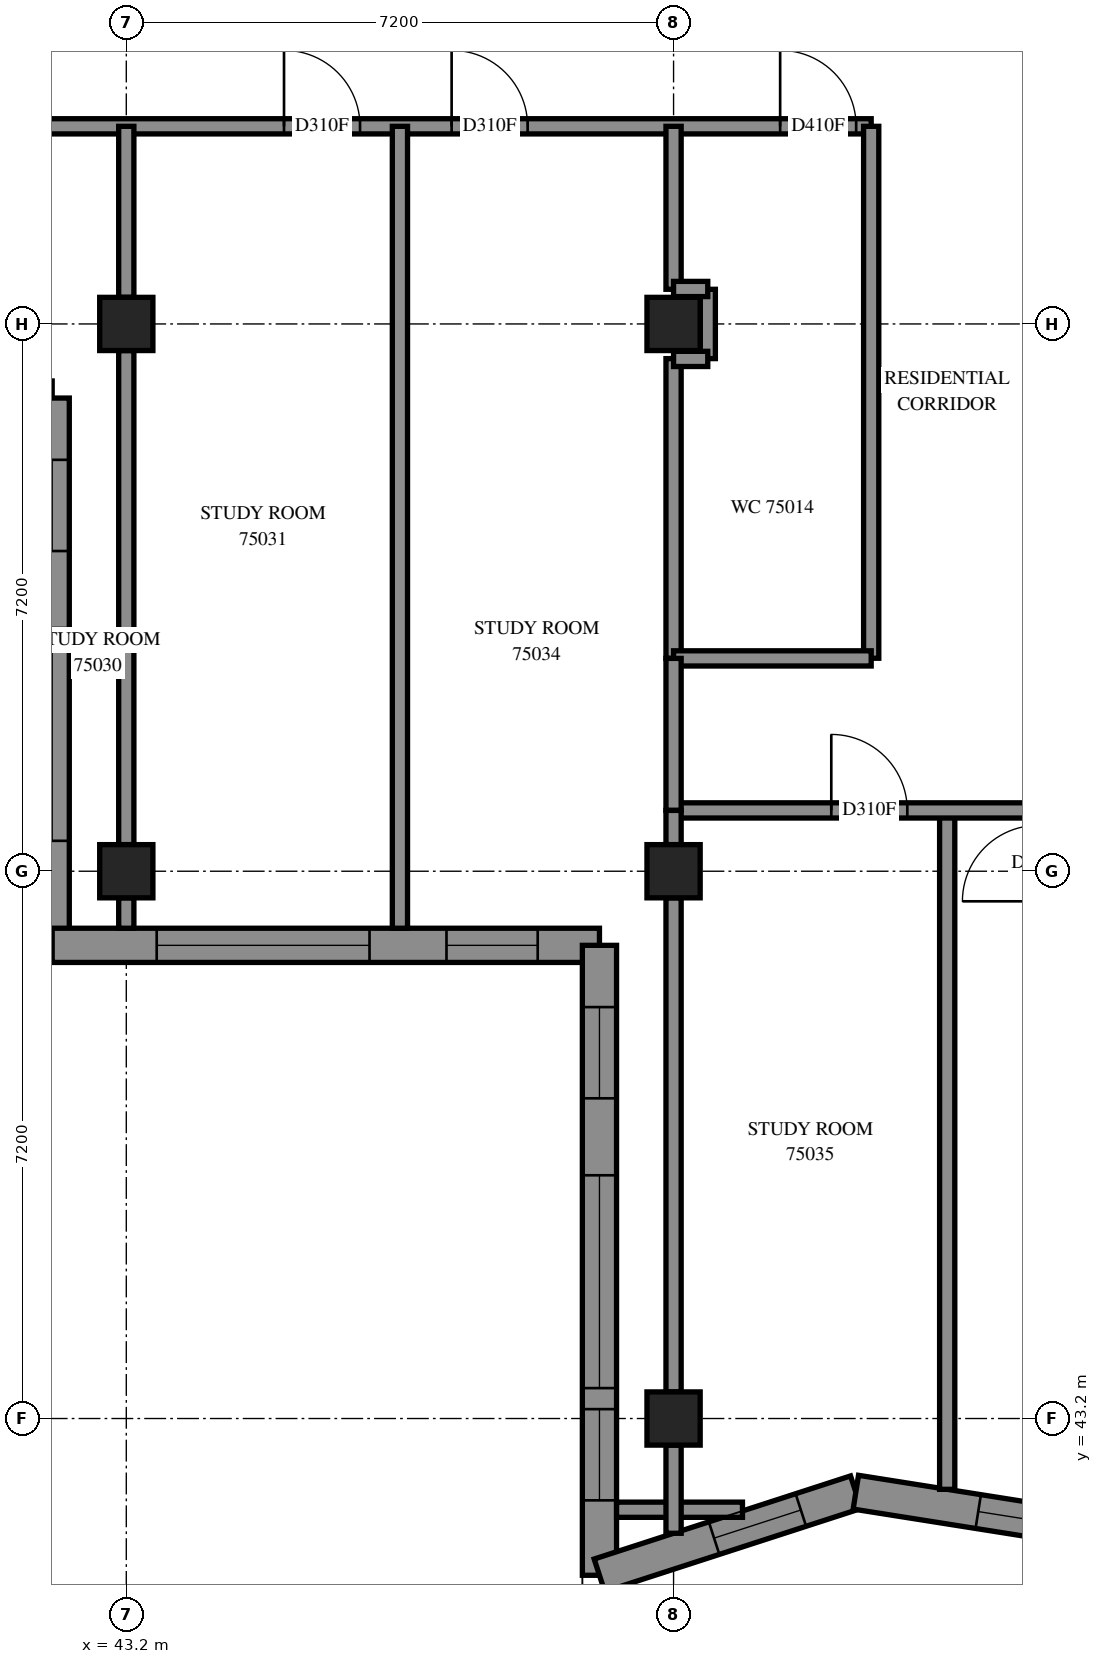
"""IFC4 building model, lengths in metres.
Left out: names, types, materials, properties, quantities, classifications, styles, units other than length and angle.
Written with IfcOpenShell. Run it as: python <this file> out.ifc"""

import sys

from ifc_helpers import new_model, si_unit, direction, frame, frame_2d, origin, origin_2d, place, context, subcontext, project, spatial, polyline, rectangle, outline, extrude, element, fill, save


model = new_model("IFC4")
c1 = context("Model", 3, precision=1e-05, world=origin(), true_north=direction((0.0, 1.0)))
c2 = subcontext(c1, "Body", "Model", "MODEL_VIEW")
j1 = project(units=[si_unit("LENGTHUNIT", "METRE"), si_unit("PLANEANGLEUNIT", "RADIAN")], contexts=[c1])
p1 = place(None, origin())
s1 = spatial("IfcSite", under=j1, at=p1, CompositionType="ELEMENT")
p2 = place(p1, origin())
s2 = spatial("IfcBuilding", under=s1, at=p2, CompositionType="ELEMENT")
p3 = place(p2, frame((0.0, 0.0, 274.4)))
s3 = spatial("IfcBuildingStorey", under=s2, at=p3, CompositionType="ELEMENT", Elevation=274.4)
for number, where, z_axis, x_axis in (
    (1, (43.2, 50.4, 0.0), (0.0, 0.0, 1.0), (1.0, 0.0, 0.0)),
    (2, (43.2, 57.6, 0.0), (0.0, 0.0, 1.0), (1.0, 0.0, 0.0)),
    (3, (50.4, 43.2, 0.0), (0.0, 0.0, 1.0), (1.0, 0.0, 0.0)),
    (4, (50.4, 50.4, 0.0), (0.0, 0.0, 1.0), (1.0, 0.0, 0.0)),
    (5, (50.4, 57.6, 0.0), (0.0, 0.0, 1.0), (1.0, 0.0, 0.0)),
):
    element("IfcColumn", number, at=place(p3, frame(where, z_axis=z_axis, x_axis=x_axis)), inside=s3, PredefinedType="COLUMN", context=c2, shape_type="SweptSolid", body=[
        extrude(rectangle(XDim=0.7, YDim=0.7, at=origin_2d()), origin(), (0.0, 0.0, 1.0), 3.1),
    ])
p4 = place(p3, frame((35.025, 56.625, 0.0), z_axis=(0.0, 0.0, 1.0), x_axis=(1.0, 0.0, 0.0)))
e6 = element("IfcWall", 6, at=p4, inside=s3, PredefinedType="SOLIDWALL", context=c2, shape_type="SweptSolid", body=[
    extrude(outline(polyline([(-0.225, -0.225), (6.975, -0.225), (7.425, 0.225), (0.225, 0.225), (-0.225, -0.225)])), origin(), (0.0, 0.0, 1.0), 3.1),
])
p5 = place(p4, frame((1.375, 0.0, 0.45)))
e7 = element("IfcOpeningElement", 7, at=p5, cuts=e6, PredefinedType="OPENING", context=c2, shape_type="SweptSolid", body=[
    extrude(rectangle(XDim=2.8, YDim=2.55, at=frame_2d((1.4, 1.275))), frame((0.0, 0.235, 0.0), z_axis=(0.0, -1.0, 0.0), x_axis=(1.0, 0.0, 0.0)), (0.0, 0.0, 1.0), 0.47),
])
p6 = place(p4, frame((5.188, 0.0, 0.45)))
e8 = element("IfcOpeningElement", 8, at=p6, cuts=e6, PredefinedType="OPENING", context=c2, shape_type="SweptSolid", body=[
    extrude(rectangle(XDim=1.2, YDim=2.55, at=frame_2d((0.6, 1.275))), frame((0.0, 0.235, 0.0), z_axis=(0.0, -1.0, 0.0), x_axis=(1.0, 0.0, 0.0)), (0.0, 0.0, 1.0), 0.47),
])
p7 = place(p3, frame((42.225, 56.625, 0.0), z_axis=(0.0, 0.0, 1.0), x_axis=(0.0, -1.0, 0.0)))
e9 = element("IfcWall", 9, at=p7, inside=s3, PredefinedType="SOLIDWALL", context=c2, shape_type="SweptSolid", body=[
    extrude(outline(polyline([(0.225, -0.225), (7.425, -0.225), (6.975, 0.225), (-0.225, 0.225), (0.225, -0.225)])), origin(), (0.0, 0.0, 1.0), 3.1),
])
p8 = place(p7, frame((3.025, 0.0, 0.45)))
e10 = element("IfcOpeningElement", 10, at=p8, cuts=e9, PredefinedType="OPENING", context=c2, shape_type="SweptSolid", body=[
    extrude(rectangle(XDim=2.8, YDim=2.55, at=frame_2d((1.4, 1.275))), frame((0.0, 0.235, 0.0), z_axis=(0.0, -1.0, 0.0), x_axis=(1.0, 0.0, 0.0)), (0.0, 0.0, 1.0), 0.47),
])
p9 = place(p7, frame((0.812, 0.0, 0.45)))
e11 = element("IfcOpeningElement", 11, at=p9, cuts=e9, PredefinedType="OPENING", context=c2, shape_type="SweptSolid", body=[
    extrude(rectangle(XDim=1.2, YDim=2.55, at=frame_2d((0.6, 1.275))), frame((0.0, 0.235, 0.0), z_axis=(0.0, -1.0, 0.0), x_axis=(1.0, 0.0, 0.0)), (0.0, 0.0, 1.0), 0.47),
])
p10 = place(p3, frame((42.225, 49.425, 0.0), z_axis=(0.0, 0.0, 1.0), x_axis=(1.0, 0.0, 0.0)))
e12 = element("IfcWall", 12, at=p10, inside=s3, PredefinedType="SOLIDWALL", context=c2, shape_type="SweptSolid", body=[
    extrude(outline(polyline([(-0.225, -0.225), (6.975, -0.225), (7.425, 0.225), (0.225, 0.225), (-0.225, -0.225)])), origin(), (0.0, 0.0, 1.0), 3.1),
])
p11 = place(p10, frame((1.375, 0.0, 0.45)))
e13 = element("IfcOpeningElement", 13, at=p11, cuts=e12, PredefinedType="OPENING", context=c2, shape_type="SweptSolid", body=[
    extrude(rectangle(XDim=2.8, YDim=2.55, at=frame_2d((1.4, 1.275))), frame((0.0, 0.235, 0.0), z_axis=(0.0, -1.0, 0.0), x_axis=(1.0, 0.0, 0.0)), (0.0, 0.0, 1.0), 0.47),
])
p12 = place(p10, frame((5.188, 0.0, 0.45)))
e14 = element("IfcOpeningElement", 14, at=p12, cuts=e12, PredefinedType="OPENING", context=c2, shape_type="SweptSolid", body=[
    extrude(rectangle(XDim=1.2, YDim=2.55, at=frame_2d((0.6, 1.275))), frame((0.0, 0.235, 0.0), z_axis=(0.0, -1.0, 0.0), x_axis=(1.0, 0.0, 0.0)), (0.0, 0.0, 1.0), 0.47),
])
p13 = place(p3, frame((49.425, 49.425, 0.0), z_axis=(0.0, 0.0, 1.0), x_axis=(0.0, -1.0, 0.0)))
e15 = element("IfcWall", 15, at=p13, inside=s3, PredefinedType="SOLIDWALL", context=c2, shape_type="SweptSolid", body=[
    extrude(outline(polyline([(0.225, -0.225), (8.597, -0.225), (7.978, 0.225), (-0.225, 0.225), (0.225, -0.225)])), origin(), (0.0, 0.0, 1.0), 3.1),
])
p14 = place(p13, frame((3.025, 0.0, 0.45)))
e16 = element("IfcOpeningElement", 16, at=p14, cuts=e15, PredefinedType="OPENING", context=c2, shape_type="SweptSolid", body=[
    extrude(rectangle(XDim=2.8, YDim=2.55, at=frame_2d((1.4, 1.275))), frame((0.0, 0.235, 0.0), z_axis=(0.0, -1.0, 0.0), x_axis=(1.0, 0.0, 0.0)), (0.0, 0.0, 1.0), 0.47),
])
p15 = place(p13, frame((0.812, 0.0, 0.45)))
e17 = element("IfcOpeningElement", 17, at=p15, cuts=e15, PredefinedType="OPENING", context=c2, shape_type="SweptSolid", body=[
    extrude(rectangle(XDim=1.2, YDim=2.55, at=frame_2d((0.6, 1.275))), frame((0.0, 0.235, 0.0), z_axis=(0.0, -1.0, 0.0), x_axis=(1.0, 0.0, 0.0)), (0.0, 0.0, 1.0), 0.47),
])
p16 = place(p13, frame((6.102, 0.0, 0.45)))
e18 = element("IfcOpeningElement", 18, at=p16, cuts=e15, PredefinedType="OPENING", context=c2, shape_type="SweptSolid", body=[
    extrude(rectangle(XDim=1.2, YDim=2.55, at=frame_2d((0.6, 1.275))), frame((0.0, 0.235, 0.0), z_axis=(0.0, -1.0, 0.0), x_axis=(1.0, 0.0, 0.0)), (0.0, 0.0, 1.0), 0.47),
])
p17 = place(p3, frame((49.425, 41.137, 0.0), z_axis=(0.0, 0.0, 1.0), x_axis=(0.9512735834, 0.3083481303, 0.0)))
e19 = element("IfcWall", 19, at=p17, inside=s3, PredefinedType="SOLIDWALL", context=c2, shape_type="SweptSolid", body=[
    extrude(outline(polyline([(-0.309, -0.225), (3.492, -0.225), (3.599, 0.225), (0.309, 0.225), (-0.309, -0.225)])), origin(), (0.0, 0.0, 1.0), 3.1),
])
p18 = place(p17, frame((1.585, 0.0, 0.45)))
e20 = element("IfcOpeningElement", 20, at=p18, cuts=e19, PredefinedType="OPENING", context=c2, shape_type="SweptSolid", body=[
    extrude(rectangle(XDim=1.2, YDim=2.55, at=frame_2d((0.6, 1.275))), frame((0.0, 0.235, 0.0), z_axis=(0.0, -1.0, 0.0), x_axis=(1.0, 0.0, 0.0)), (0.0, 0.0, 1.0), 0.47),
])
p19 = place(p3, frame((52.798, 42.231, 0.0), z_axis=(0.0, 0.0, 1.0), x_axis=(0.9877170854, -0.1562528693, 0.0)))
e21 = element("IfcWall", 21, at=p19, inside=s3, PredefinedType="SOLIDWALL", context=c2, shape_type="SweptSolid", body=[
    extrude(outline(polyline([(0.054, -0.225), (3.715, -0.225), (3.644, 0.225), (-0.054, 0.225), (0.054, -0.225)])), origin(), (0.0, 0.0, 1.0), 3.1),
])
p20 = place(p19, frame((1.63, 0.0, 0.45)))
e22 = element("IfcOpeningElement", 22, at=p20, cuts=e21, PredefinedType="OPENING", context=c2, shape_type="SweptSolid", body=[
    extrude(rectangle(XDim=1.2, YDim=2.55, at=frame_2d((0.6, 1.275))), frame((0.0, 0.235, 0.0), z_axis=(0.0, -1.0, 0.0), x_axis=(1.0, 0.0, 0.0)), (0.0, 0.0, 1.0), 0.47),
])
p21 = place(p3, frame((36.0, 60.2, 0.0), z_axis=(0.0, 0.0, 1.0), x_axis=(1.0, 0.0, 0.0)))
e23 = element("IfcWall", 23, at=p21, inside=s3, PredefinedType="PARTITIONING", context=c2, shape_type="SweptSolid", body=[
    extrude(rectangle(XDim=17.0, YDim=0.2, at=frame_2d((8.5, 0.0))), origin(), (0.0, 0.0, 1.0), 3.1),
])
p22 = place(p21, frame((15.802, 0.0, 0.0)))
e24 = element("IfcOpeningElement", 24, at=p22, cuts=e23, PredefinedType="OPENING", context=c2, shape_type="SweptSolid", body=[
    extrude(rectangle(XDim=1.0, YDim=2.1, at=frame_2d((0.5, 1.05))), frame((0.0, 0.11, 0.0), z_axis=(0.0, -1.0, 0.0), x_axis=(1.0, 0.0, 0.0)), (0.0, 0.0, 1.0), 0.22),
])
p23 = place(p21, frame((2.075, 0.0, 0.0)))
e25 = element("IfcOpeningElement", 25, at=p23, cuts=e23, PredefinedType="OPENING", context=c2, shape_type="SweptSolid", body=[
    extrude(rectangle(XDim=1.0, YDim=2.1, at=frame_2d((0.5, 1.05))), frame((0.0, 0.11, 0.0), z_axis=(0.0, -1.0, 0.0), x_axis=(1.0, 0.0, 0.0)), (0.0, 0.0, 1.0), 0.22),
])
p24 = place(p21, frame((4.125, 0.0, 0.0)))
e26 = element("IfcOpeningElement", 26, at=p24, cuts=e23, PredefinedType="OPENING", context=c2, shape_type="SweptSolid", body=[
    extrude(rectangle(XDim=1.0, YDim=2.1, at=frame_2d((0.5, 1.05))), frame((0.0, 0.11, 0.0), z_axis=(0.0, -1.0, 0.0), x_axis=(1.0, 0.0, 0.0)), (0.0, 0.0, 1.0), 0.22),
])
p25 = place(p21, frame((9.275, 0.0, 0.0)))
e27 = element("IfcOpeningElement", 27, at=p25, cuts=e23, PredefinedType="OPENING", context=c2, shape_type="SweptSolid", body=[
    extrude(rectangle(XDim=1.0, YDim=2.1, at=frame_2d((0.5, 1.05))), frame((0.0, 0.11, 0.0), z_axis=(0.0, -1.0, 0.0), x_axis=(1.0, 0.0, 0.0)), (0.0, 0.0, 1.0), 0.22),
])
p26 = place(p21, frame((11.48, 0.0, 0.0)))
e28 = element("IfcOpeningElement", 28, at=p26, cuts=e23, PredefinedType="OPENING", context=c2, shape_type="SweptSolid", body=[
    extrude(rectangle(XDim=1.0, YDim=2.1, at=frame_2d((0.5, 1.05))), frame((0.0, 0.11, 0.0), z_axis=(0.0, -1.0, 0.0), x_axis=(1.0, 0.0, 0.0)), (0.0, 0.0, 1.0), 0.22),
])
p27 = place(p3, frame((46.8, 49.65, 0.0), z_axis=(0.0, 0.0, 1.0), x_axis=(0.0, 1.0, 0.0)))
e29 = element("IfcWall", 29, at=p27, inside=s3, PredefinedType="PARTITIONING", context=c2, shape_type="SweptSolid", body=[
    extrude(rectangle(XDim=10.55, YDim=0.2, at=frame_2d((5.275, 0.0))), origin(), (0.0, 0.0, 1.0), 3.1),
])
p28 = place(p3, frame((54.0, 42.268, 0.0), z_axis=(0.0, 0.0, 1.0), x_axis=(0.0, 1.0, 0.0)))
e30 = element("IfcWall", 30, at=p28, inside=s3, PredefinedType="PARTITIONING", context=c2, shape_type="SweptSolid", body=[
    extrude(rectangle(XDim=8.932, YDim=0.2, at=frame_2d((4.466, 0.0))), origin(), (0.0, 0.0, 1.0), 3.1),
])
p29 = place(p3, frame((53.0, 53.202, 0.0), z_axis=(0.0, 0.0, 1.0), x_axis=(0.0, 1.0, 0.0)))
e31 = element("IfcWall", 31, at=p29, inside=s3, PredefinedType="PARTITIONING", context=c2, shape_type="SweptSolid", body=[
    extrude(rectangle(XDim=6.998, YDim=0.2, at=frame_2d((3.499, 0.0))), origin(), (0.0, 0.0, 1.0), 3.1),
])
for number, where, z_axis, x_axis in (
    (32, (43.2, 50.75, 0.0), (0.0, 0.0, 1.0), (0.0, 1.0, 0.0)),
    (33, (50.4, 43.55, 0.0), (0.0, 0.0, 1.0), (0.0, 1.0, 0.0)),
):
    element("IfcWall", number, at=place(p3, frame(where, z_axis=z_axis, x_axis=x_axis)), inside=s3, PredefinedType="PARTITIONING", context=c2, shape_type="SweptSolid", body=[
        extrude(rectangle(XDim=6.5, YDim=0.2, at=frame_2d((3.25, 0.0))), origin(), (0.0, 0.0, 1.0), 2.6),
    ])
p30 = place(p3, frame((50.4, 51.2, 0.0), z_axis=(0.0, 0.0, 1.0), x_axis=(1.0, 0.0, 0.0)))
e34 = element("IfcWall", 34, at=p30, inside=s3, PredefinedType="PARTITIONING", context=c2, shape_type="SweptSolid", body=[
    extrude(rectangle(XDim=4.8, YDim=0.2, at=frame_2d((2.4, 0.0))), origin(), (0.0, 0.0, 1.0), 3.1),
])
p31 = place(p30, frame((2.075, 0.0, 0.0)))
e35 = element("IfcOpeningElement", 35, at=p31, cuts=e34, PredefinedType="OPENING", context=c2, shape_type="SweptSolid", body=[
    extrude(rectangle(XDim=1.0, YDim=2.1, at=frame_2d((0.5, 1.05))), frame((0.0, 0.11, 0.0), z_axis=(0.0, -1.0, 0.0), x_axis=(1.0, 0.0, 0.0)), (0.0, 0.0, 1.0), 0.22),
])
p32 = place(p3, frame((50.4, 53.2, 0.0), z_axis=(0.0, 0.0, 1.0), x_axis=(0.0, 1.0, 0.0)))
e36 = element("IfcWall", 36, at=p32, inside=s3, PredefinedType="PARTITIONING", context=c2, shape_type="SweptSolid", body=[
    extrude(rectangle(XDim=3.944, YDim=0.2, at=frame_2d((1.972, 0.0))), origin(), (0.0, 0.0, 1.0), 3.1),
])
p33 = place(p3, frame((50.4, 53.2, 0.0), z_axis=(0.0, 0.0, 1.0), x_axis=(1.0, 0.0, 0.0)))
e37 = element("IfcWall", 37, at=p33, inside=s3, PredefinedType="PARTITIONING", context=c2, shape_type="SweptSolid", body=[
    extrude(rectangle(XDim=2.6, YDim=0.2, at=frame_2d((1.3, 0.0))), origin(), (0.0, 0.0, 1.0), 3.1),
])
p34 = place(p3, frame((43.2, 57.95, 0.0), z_axis=(0.0, 0.0, 1.0), x_axis=(0.0, 1.0, 0.0)))
e38 = element("IfcWall", 38, at=p34, inside=s3, PredefinedType="PARTITIONING", context=c2, shape_type="SweptSolid", body=[
    extrude(rectangle(XDim=2.25, YDim=0.2, at=frame_2d((1.125, 0.0))), origin(), (0.0, 0.0, 1.0), 3.1),
])
p35 = place(p3, frame((50.4, 58.056, 0.0), z_axis=(0.0, 0.0, 1.0), x_axis=(0.0, 1.0, 0.0)))
e39 = element("IfcWall", 39, at=p35, inside=s3, PredefinedType="PARTITIONING", context=c2, shape_type="SweptSolid", body=[
    extrude(rectangle(XDim=2.144, YDim=0.2, at=frame_2d((1.072, 0.0))), origin(), (0.0, 0.0, 1.0), 3.1),
])
p36 = place(p3, frame((50.4, 51.2, 0.0), z_axis=(0.0, 0.0, 1.0), x_axis=(0.0, 1.0, 0.0)))
e40 = element("IfcWall", 40, at=p36, inside=s3, PredefinedType="PARTITIONING", context=c2, shape_type="SweptSolid", body=[
    extrude(rectangle(XDim=2.0, YDim=0.2, at=frame_2d((1.0, 0.0))), origin(), (0.0, 0.0, 1.0), 3.1),
])
p37 = place(p3, frame((49.65, 42.0, 0.0), z_axis=(0.0, 0.0, 1.0), x_axis=(1.0, 0.0, 0.0)))
e41 = element("IfcWall", 41, at=p37, inside=s3, PredefinedType="PARTITIONING", context=c2, shape_type="SweptSolid", body=[
    extrude(rectangle(XDim=1.657, YDim=0.2, at=frame_2d((0.828, 0.0))), origin(), (0.0, 0.0, 1.0), 3.1),
])
p38 = place(p3, frame((50.85, 57.144, 0.0), z_axis=(0.0, 0.0, 1.0), x_axis=(0.0, 1.0, 0.0)))
e42 = element("IfcWall", 42, at=p38, inside=s3, PredefinedType="PARTITIONING", context=c2, shape_type="SweptSolid", body=[
    extrude(rectangle(XDim=0.912, YDim=0.2, at=frame_2d((0.456, 0.0))), origin(), (0.0, 0.0, 1.0), 3.1),
])
p39 = place(p3, frame((50.4, 41.69, 0.0), z_axis=(0.0, 0.0, 1.0), x_axis=(0.0, 1.0, 0.0)))
e43 = element("IfcWall", 43, at=p39, inside=s3, PredefinedType="PARTITIONING", context=c2, shape_type="SweptSolid", body=[
    extrude(rectangle(XDim=1.16, YDim=0.2, at=frame_2d((0.58, 0.0))), origin(), (0.0, 0.0, 1.0), 3.1),
])
for number, where, z_axis, x_axis in (
    (44, (50.4, 50.75, 0.0), (0.0, 0.0, 1.0), (0.0, 1.0, 0.0)),
    (45, (50.4, 57.14, 0.0), (0.0, 0.0, 1.0), (1.0, 0.0, 0.0)),
    (46, (50.4, 58.06, 0.0), (0.0, 0.0, 1.0), (1.0, 0.0, 0.0)),
):
    element("IfcWall", number, at=place(p3, frame(where, z_axis=z_axis, x_axis=x_axis)), inside=s3, PredefinedType="PARTITIONING", context=c2, shape_type="SweptSolid", body=[
        extrude(rectangle(XDim=0.45, YDim=0.2, at=frame_2d((0.225, 0.0))), origin(), (0.0, 0.0, 1.0), 3.1),
    ])
p40 = place(p3, frame((43.2, 49.65, 0.0), z_axis=(0.0, 0.0, 1.0), x_axis=(0.0, 1.0, 0.0)))
e47 = element("IfcWall", 47, at=p40, inside=s3, PredefinedType="PARTITIONING", context=c2, shape_type="SweptSolid", body=[
    extrude(rectangle(XDim=0.4, YDim=0.2, at=frame_2d((0.2, 0.0))), origin(), (0.0, 0.0, 1.0), 3.1),
])
p41 = place(p8, origin())
e48 = element("IfcWindow", 48, at=p41, inside=s3, PartitioningType="SINGLE_PANEL", PredefinedType="WINDOW", context=c2, shape_type="SweptSolid", body=[
    extrude(rectangle(XDim=2.8, YDim=2.55, at=frame_2d((1.4, 1.275))), frame((0.0, 0.205, 0.0), z_axis=(0.0, -1.0, 0.0), x_axis=(1.0, 0.0, 0.0)), (0.0, 0.0, 1.0), 0.06),
])
fill(e10, e48)
p42 = place(p9, origin())
e49 = element("IfcWindow", 49, at=p42, inside=s3, PartitioningType="SINGLE_PANEL", PredefinedType="WINDOW", context=c2, shape_type="SweptSolid", body=[
    extrude(rectangle(XDim=1.2, YDim=2.55, at=frame_2d((0.6, 1.275))), frame((0.0, 0.205, 0.0), z_axis=(0.0, -1.0, 0.0), x_axis=(1.0, 0.0, 0.0)), (0.0, 0.0, 1.0), 0.06),
])
fill(e11, e49)
p43 = place(p11, origin())
e50 = element("IfcWindow", 50, at=p43, inside=s3, PartitioningType="SINGLE_PANEL", PredefinedType="WINDOW", context=c2, shape_type="SweptSolid", body=[
    extrude(rectangle(XDim=2.8, YDim=2.55, at=frame_2d((1.4, 1.275))), frame((0.0, 0.205, 0.0), z_axis=(0.0, -1.0, 0.0), x_axis=(1.0, 0.0, 0.0)), (0.0, 0.0, 1.0), 0.06),
])
fill(e13, e50)
p44 = place(p12, origin())
e51 = element("IfcWindow", 51, at=p44, inside=s3, PartitioningType="SINGLE_PANEL", PredefinedType="WINDOW", context=c2, shape_type="SweptSolid", body=[
    extrude(rectangle(XDim=1.2, YDim=2.55, at=frame_2d((0.6, 1.275))), frame((0.0, 0.205, 0.0), z_axis=(0.0, -1.0, 0.0), x_axis=(1.0, 0.0, 0.0)), (0.0, 0.0, 1.0), 0.06),
])
fill(e14, e51)
p45 = place(p14, origin())
e52 = element("IfcWindow", 52, at=p45, inside=s3, PartitioningType="SINGLE_PANEL", PredefinedType="WINDOW", context=c2, shape_type="SweptSolid", body=[
    extrude(rectangle(XDim=2.8, YDim=2.55, at=frame_2d((1.4, 1.275))), frame((0.0, 0.205, 0.0), z_axis=(0.0, -1.0, 0.0), x_axis=(1.0, 0.0, 0.0)), (0.0, 0.0, 1.0), 0.06),
])
fill(e16, e52)
p46 = place(p15, origin())
e53 = element("IfcWindow", 53, at=p46, inside=s3, PartitioningType="SINGLE_PANEL", PredefinedType="WINDOW", context=c2, shape_type="SweptSolid", body=[
    extrude(rectangle(XDim=1.2, YDim=2.55, at=frame_2d((0.6, 1.275))), frame((0.0, 0.205, 0.0), z_axis=(0.0, -1.0, 0.0), x_axis=(1.0, 0.0, 0.0)), (0.0, 0.0, 1.0), 0.06),
])
fill(e17, e53)
p47 = place(p16, origin())
e54 = element("IfcWindow", 54, at=p47, inside=s3, PartitioningType="SINGLE_PANEL", PredefinedType="WINDOW", context=c2, shape_type="SweptSolid", body=[
    extrude(rectangle(XDim=1.2, YDim=2.55, at=frame_2d((0.6, 1.275))), frame((0.0, 0.205, 0.0), z_axis=(0.0, -1.0, 0.0), x_axis=(1.0, 0.0, 0.0)), (0.0, 0.0, 1.0), 0.06),
])
fill(e18, e54)
p48 = place(p18, origin())
e55 = element("IfcWindow", 55, at=p48, inside=s3, PartitioningType="SINGLE_PANEL", PredefinedType="WINDOW", context=c2, shape_type="SweptSolid", body=[
    extrude(rectangle(XDim=1.2, YDim=2.55, at=frame_2d((0.6, 1.275))), frame((0.0, 0.115, 0.0), z_axis=(0.0, -1.0, 0.0), x_axis=(1.0, 0.0, 0.0)), (0.0, 0.0, 1.0), 0.06),
])
fill(e20, e55)
p49 = place(p20, origin())
e56 = element("IfcWindow", 56, at=p49, inside=s3, PartitioningType="SINGLE_PANEL", PredefinedType="WINDOW", context=c2, shape_type="SweptSolid", body=[
    extrude(rectangle(XDim=1.2, YDim=2.55, at=frame_2d((0.6, 1.275))), frame((0.0, 0.205, 0.0), z_axis=(0.0, -1.0, 0.0), x_axis=(1.0, 0.0, 0.0)), (0.0, 0.0, 1.0), 0.06),
])
fill(e22, e56)
p50 = place(p22, origin())
e57 = element("IfcDoor", 57, at=p50, inside=s3, OperationType="SINGLE_SWING_LEFT", PredefinedType="DOOR", context=c2, shape_type="SweptSolid", body=[
    extrude(rectangle(XDim=1.0, YDim=2.1, at=frame_2d((0.5, 1.05))), frame((0.0, 0.025, 0.0), z_axis=(0.0, -1.0, 0.0), x_axis=(1.0, 0.0, 0.0)), (0.0, 0.0, 1.0), 0.05),
])
fill(e24, e57)
p51 = place(p25, origin())
e58 = element("IfcDoor", 58, at=p51, inside=s3, OperationType="SINGLE_SWING_LEFT", PredefinedType="DOOR", context=c2, shape_type="SweptSolid", body=[
    extrude(rectangle(XDim=1.0, YDim=2.1, at=frame_2d((0.5, 1.05))), frame((0.0, 0.025, 0.0), z_axis=(0.0, -1.0, 0.0), x_axis=(1.0, 0.0, 0.0)), (0.0, 0.0, 1.0), 0.05),
])
fill(e27, e58)
p52 = place(p26, origin())
e59 = element("IfcDoor", 59, at=p52, inside=s3, OperationType="SINGLE_SWING_RIGHT", PredefinedType="DOOR", context=c2, shape_type="SweptSolid", body=[
    extrude(rectangle(XDim=1.0, YDim=2.1, at=frame_2d((0.5, 1.05))), frame((0.0, 0.025, 0.0), z_axis=(0.0, -1.0, 0.0), x_axis=(1.0, 0.0, 0.0)), (0.0, 0.0, 1.0), 0.05),
])
fill(e28, e59)
p53 = place(p31, origin())
e60 = element("IfcDoor", 60, at=p53, inside=s3, OperationType="SINGLE_SWING_LEFT", PredefinedType="DOOR", context=c2, shape_type="SweptSolid", body=[
    extrude(rectangle(XDim=1.0, YDim=2.1, at=frame_2d((0.5, 1.05))), frame((0.0, 0.025, 0.0), z_axis=(0.0, -1.0, 0.0), x_axis=(1.0, 0.0, 0.0)), (0.0, 0.0, 1.0), 0.05),
])
fill(e35, e60)
save(model, sys.argv[1])
